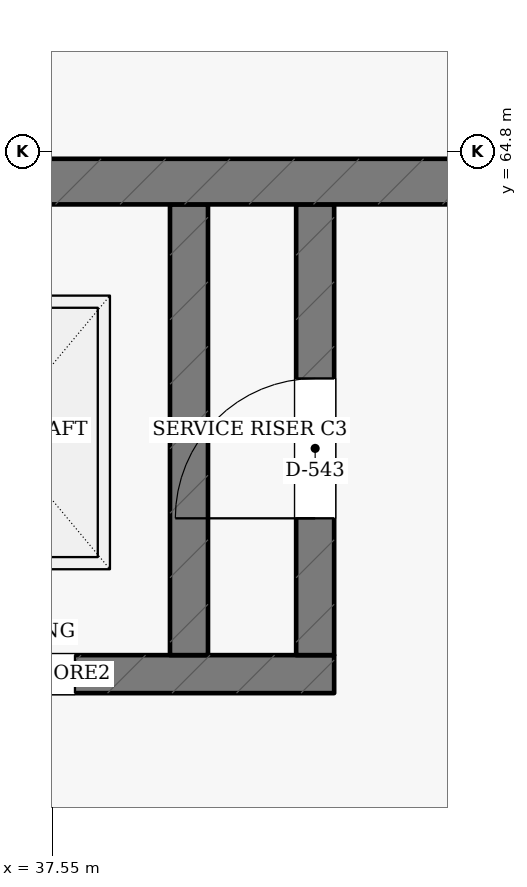
"""IFC4 building model, lengths in metres.
Left out: names, types, materials, properties, quantities, classifications, styles, units other than length and angle.
Written with IfcOpenShell. Run it as: python <this file> out.ifc"""

import sys

from ifc_helpers import new_model, si_unit, direction, frame, frame_2d, origin, place, context, subcontext, project, spatial, rectangle, extrude, element, fill, save


model = new_model("IFC4")
c1 = context("Model", 3, precision=1e-05, world=origin(), true_north=direction((0.0, 1.0)))
c2 = subcontext(c1, "Body", "Model", "MODEL_VIEW")
j1 = project(units=[si_unit("LENGTHUNIT", "METRE"), si_unit("PLANEANGLEUNIT", "RADIAN")], contexts=[c1])
p1 = place(None, origin())
s1 = spatial("IfcSite", under=j1, at=p1, CompositionType="ELEMENT")
p2 = place(p1, origin())
s2 = spatial("IfcBuilding", under=s1, at=p2, CompositionType="ELEMENT")
p3 = place(p2, origin())
s3 = spatial("IfcBuildingStorey", under=s2, at=p3, CompositionType="ELEMENT", Elevation=0.0)
p4 = place(p3, frame((35.825, 61.36, 0.0), z_axis=(0.0, 0.0, 1.0), x_axis=(1.0, 0.0, 0.0)))
e1 = element("IfcWall", 1, at=p4, inside=s3, PredefinedType="SHEAR", context=c2, shape_type="SweptSolid", body=[
    extrude(rectangle(XDim=3.58, YDim=0.25, at=frame_2d((1.79, 0.0))), origin(), (0.0, 0.0, 1.0), 4.45),
])
p5 = place(p4, frame((0.775, 0.0, 0.0)))
e2 = element("IfcOpeningElement", 2, at=p5, cuts=e1, PredefinedType="OPENING", context=c2, shape_type="SweptSolid", body=[
    extrude(rectangle(XDim=1.1, YDim=2.15, at=frame_2d((0.55, 1.075))), frame((0.0, 0.135, 0.0), z_axis=(0.0, -1.0, 0.0), x_axis=(1.0, 0.0, 0.0)), (0.0, 0.0, 1.0), 0.27),
])
p6 = place(p3, frame((38.45, 61.485, 0.0), z_axis=(0.0, 0.0, 1.0), x_axis=(0.0, 1.0, 0.0)))
e3 = element("IfcWall", 3, at=p6, inside=s3, PredefinedType="SHEAR", context=c2, shape_type="SweptSolid", body=[
    extrude(rectangle(XDim=2.965, YDim=0.25, at=frame_2d((1.482, 0.0))), origin(), (0.0, 0.0, 1.0), 4.45),
])
p7 = place(p3, frame((39.28, 61.485, 0.0), z_axis=(0.0, 0.0, 1.0), x_axis=(0.0, 1.0, 0.0)))
e4 = element("IfcWall", 4, at=p7, inside=s3, PredefinedType="SHEAR", context=c2, shape_type="SweptSolid", body=[
    extrude(rectangle(XDim=2.965, YDim=0.25, at=frame_2d((1.482, 0.0))), origin(), (0.0, 0.0, 1.0), 4.45),
])
p8 = place(p7, frame((0.9, 0.0, 0.0)))
e5 = element("IfcOpeningElement", 5, at=p8, cuts=e4, PredefinedType="OPENING", context=c2, shape_type="SweptSolid", body=[
    extrude(rectangle(XDim=0.92, YDim=2.05, at=frame_2d((0.46, 1.025))), frame((0.0, 0.135, 0.0), z_axis=(0.0, -1.0, 0.0), x_axis=(1.0, 0.0, 0.0)), (0.0, 0.0, 1.0), 0.27),
])
p9 = place(p3, frame((28.85, 64.6, 0.0), z_axis=(0.0, 0.0, 1.0), x_axis=(1.0, 0.0, 0.0)))
e6 = element("IfcWall", 6, at=p9, inside=s3, PredefinedType="SHEAR", context=c2, shape_type="SweptSolid", body=[
    extrude(rectangle(XDim=14.35, YDim=0.3, at=frame_2d((7.175, 0.0))), origin(), (0.0, 0.0, 1.0), 4.45),
])
p10 = place(p5, origin())
e7 = element("IfcDoor", 7, at=p10, inside=s3, OperationType="SLIDING_TO_LEFT", PredefinedType="DOOR", context=c2, shape_type="SweptSolid", body=[
    extrude(rectangle(XDim=1.1, YDim=2.15, at=frame_2d((0.55, 1.075))), frame((0.0, 0.025, 0.0), z_axis=(0.0, -1.0, 0.0), x_axis=(1.0, 0.0, 0.0)), (0.0, 0.0, 1.0), 0.05),
])
fill(e2, e7)
p11 = place(p8, origin())
e8 = element("IfcDoor", 8, at=p11, inside=s3, OperationType="SINGLE_SWING_LEFT", PredefinedType="DOOR", context=c2, shape_type="SweptSolid", body=[
    extrude(rectangle(XDim=0.92, YDim=2.05, at=frame_2d((0.46, 1.025))), frame((0.0, 0.025, 0.0), z_axis=(0.0, -1.0, 0.0), x_axis=(1.0, 0.0, 0.0)), (0.0, 0.0, 1.0), 0.05),
])
fill(e5, e8)
save(model, sys.argv[1])
